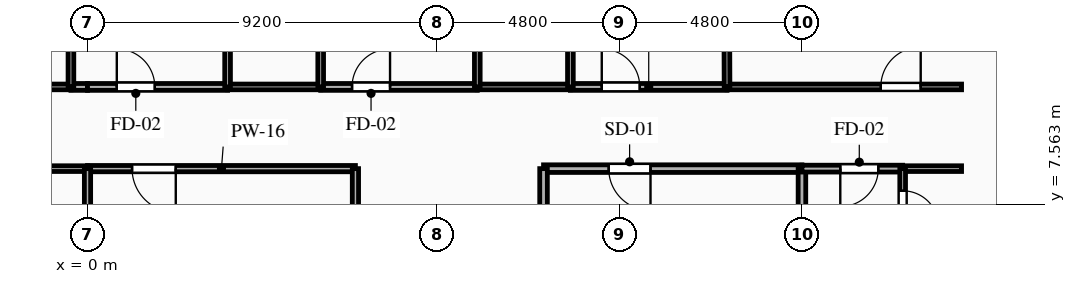
"""IFC4 building model, lengths in metres.
Left out: names, types, materials, properties, quantities, classifications, styles, units other than length and angle.
Written with IfcOpenShell. Run it as: python <this file> out.ifc"""

import sys

from ifc_helpers import new_model, si_unit, direction, frame, frame_2d, origin, place, context, subcontext, project, spatial, rectangle, extrude, element, fill, save


model = new_model("IFC4")
c1 = context("Model", 3, precision=1e-05, world=origin(), true_north=direction((0.0, 1.0)))
c2 = subcontext(c1, "Body", "Model", "MODEL_VIEW")
j1 = project(units=[si_unit("LENGTHUNIT", "METRE"), si_unit("PLANEANGLEUNIT", "RADIAN")], contexts=[c1])
p1 = place(None, origin())
s1 = spatial("IfcSite", under=j1, at=p1, CompositionType="ELEMENT")
p2 = place(p1, origin())
s2 = spatial("IfcBuilding", under=s1, at=p2, CompositionType="ELEMENT")
p3 = place(p2, frame((0.0, 0.0, 89.05)))
s3 = spatial("IfcBuildingStorey", under=s2, at=p3, CompositionType="ELEMENT", Elevation=89.05)
p4 = place(p3, frame((18.8, 8.5, 0.0), z_axis=(0.0, 0.0, 1.0), x_axis=(-1.0, 0.0, 0.0)))
e1 = element("IfcWall", 1, at=p4, inside=s3, PredefinedType="PARTITIONING", context=c2, shape_type="SweptSolid", body=[
    extrude(rectangle(XDim=6.8, YDim=0.2, at=frame_2d((3.4, 0.0))), origin(), (0.0, 0.0, 1.0), 3.045),
])
p5 = place(p4, frame((3.985, 0.0, 0.0)))
e2 = element("IfcOpeningElement", 2, at=p5, cuts=e1, PredefinedType="OPENING", context=c2, shape_type="SweptSolid", body=[
    extrude(rectangle(XDim=1.1, YDim=2.15, at=frame_2d((0.55, 1.075))), frame((0.0, 0.11, 0.0), z_axis=(0.0, -1.0, 0.0), x_axis=(1.0, 0.0, 0.0)), (0.0, 0.0, 1.0), 0.22),
])
p6 = place(p3, frame((12.0, 8.5, 0.0), z_axis=(0.0, 0.0, 1.0), x_axis=(0.0, -1.0, 0.0)))
e3 = element("IfcWall", 3, at=p6, inside=s3, PredefinedType="PARTITIONING", context=c2, shape_type="SweptSolid", body=[
    extrude(rectangle(XDim=2.9, YDim=0.2, at=frame_2d((1.45, 0.0))), origin(), (0.0, 0.0, 1.0), 3.045),
])
p7 = place(p3, frame((18.8, 5.6, 0.0), z_axis=(0.0, 0.0, 1.0), x_axis=(0.0, 1.0, 0.0)))
e4 = element("IfcWall", 4, at=p7, inside=s3, PredefinedType="PARTITIONING", context=c2, shape_type="SweptSolid", body=[
    extrude(rectangle(XDim=2.9, YDim=0.2, at=frame_2d((1.45, 0.0))), origin(), (0.0, 0.0, 1.0), 2.53),
])
p8 = place(p3, frame((-0.436, 10.65, 0.0), z_axis=(0.0, 0.0, 1.0), x_axis=(1.0, 0.0, 0.0)))
e5 = element("IfcWall", 5, at=p8, inside=s3, PredefinedType="PARTITIONING", context=c2, shape_type="SweptSolid", body=[
    extrude(rectangle(XDim=0.436, YDim=0.18, at=frame_2d((0.218, 0.0))), origin(), (0.0, 0.0, 1.0), 3.045),
])
p9 = place(p3, frame((-2.886, 10.65, 0.0), z_axis=(0.0, 0.0, 1.0), x_axis=(1.0, 0.0, 0.0)))
e6 = element("IfcWall", 6, at=p9, inside=s3, PredefinedType="PLUMBINGWALL", context=c2, shape_type="SweptSolid", body=[
    extrude(rectangle(XDim=2.45, YDim=0.15, at=frame_2d((1.225, 0.0))), origin(), (0.0, 0.0, 1.0), 3.045),
])
p10 = place(p3, frame((0.0, 8.5, 0.0), z_axis=(0.0, 0.0, 1.0), x_axis=(-1.0, 0.0, 0.0)))
e7 = element("IfcWall", 7, at=p10, inside=s3, PredefinedType="PARTITIONING", context=c2, shape_type="SweptSolid", body=[
    extrude(rectangle(XDim=7.05, YDim=0.15, at=frame_2d((3.525, 0.0))), origin(), (0.0, 0.0, 1.0), 3.045),
])
p11 = place(p3, frame((21.45, 8.5, 0.0), z_axis=(0.0, 0.0, 1.0), x_axis=(-1.0, 0.0, 0.0)))
e8 = element("IfcWall", 8, at=p11, inside=s3, PredefinedType="PARTITIONING", context=c2, shape_type="SweptSolid", body=[
    extrude(rectangle(XDim=2.65, YDim=0.18, at=frame_2d((1.325, 0.0))), origin(), (0.0, 0.0, 1.0), 3.045),
])
p12 = place(p11, frame((0.641, 0.0, 0.0)))
e9 = element("IfcOpeningElement", 9, at=p12, cuts=e8, PredefinedType="OPENING", context=c2, shape_type="SweptSolid", body=[
    extrude(rectangle(XDim=1.0, YDim=2.15, at=frame_2d((0.5, 1.075))), frame((0.0, 0.1, 0.0), z_axis=(0.0, -1.0, 0.0), x_axis=(1.0, 0.0, 0.0)), (0.0, 0.0, 1.0), 0.2),
])
p13 = place(p3, frame((23.0, 8.5, 0.0), z_axis=(0.0, 0.0, 1.0), x_axis=(-1.0, 0.0, 0.0)))
e10 = element("IfcWall", 10, at=p13, inside=s3, PredefinedType="PARTITIONING", context=c2, shape_type="SweptSolid", body=[
    extrude(rectangle(XDim=1.55, YDim=0.15, at=frame_2d((0.775, 0.0))), origin(), (0.0, 0.0, 1.0), 3.045),
])
p14 = place(p3, frame((0.0, 10.65, 0.0), z_axis=(0.0, 0.0, 1.0), x_axis=(1.0, 0.0, 0.0)))
e11 = element("IfcWall", 11, at=p14, inside=s3, PredefinedType="PARTITIONING", context=c2, shape_type="SweptSolid", body=[
    extrude(rectangle(XDim=3.686, YDim=0.18, at=frame_2d((1.843, 0.0))), origin(), (0.0, 0.0, 1.0), 3.045),
])
p15 = place(p14, frame((0.771, 0.0, 0.0)))
e12 = element("IfcOpeningElement", 12, at=p15, cuts=e11, PredefinedType="OPENING", context=c2, shape_type="SweptSolid", body=[
    extrude(rectangle(XDim=1.0, YDim=2.15, at=frame_2d((0.5, 1.075))), frame((0.0, 0.1, 0.0), z_axis=(0.0, -1.0, 0.0), x_axis=(1.0, 0.0, 0.0)), (0.0, 0.0, 1.0), 0.2),
])
p16 = place(p3, frame((6.136, 10.65, 0.0), z_axis=(0.0, 0.0, 1.0), x_axis=(1.0, 0.0, 0.0)))
e13 = element("IfcWall", 13, at=p16, inside=s3, PredefinedType="PARTITIONING", context=c2, shape_type="SweptSolid", body=[
    extrude(rectangle(XDim=4.121, YDim=0.18, at=frame_2d((2.061, 0.0))), origin(), (0.0, 0.0, 1.0), 3.045),
])
p17 = place(p16, frame((0.825, 0.0, 0.0)))
e14 = element("IfcOpeningElement", 14, at=p17, cuts=e13, PredefinedType="OPENING", context=c2, shape_type="SweptSolid", body=[
    extrude(rectangle(XDim=1.0, YDim=2.15, at=frame_2d((0.5, 1.075))), frame((0.0, 0.1, 0.0), z_axis=(0.0, -1.0, 0.0), x_axis=(1.0, 0.0, 0.0)), (0.0, 0.0, 1.0), 0.2),
])
p18 = place(p3, frame((3.686, 10.65, 0.0), z_axis=(0.0, 0.0, 1.0), x_axis=(1.0, 0.0, 0.0)))
e15 = element("IfcWall", 15, at=p18, inside=s3, PredefinedType="PLUMBINGWALL", context=c2, shape_type="SweptSolid", body=[
    extrude(rectangle(XDim=2.45, YDim=0.15, at=frame_2d((1.225, 0.0))), origin(), (0.0, 0.0, 1.0), 3.045),
])
p19 = place(p3, frame((12.707, 10.65, 0.0), z_axis=(0.0, 0.0, 1.0), x_axis=(1.0, 0.0, 0.0)))
e16 = element("IfcWall", 16, at=p19, inside=s3, PredefinedType="PARTITIONING", context=c2, shape_type="SweptSolid", body=[
    extrude(rectangle(XDim=4.122, YDim=0.18, at=frame_2d((2.061, 0.0))), origin(), (0.0, 0.0, 1.0), 3.045),
])
p20 = place(p19, frame((0.825, 0.0, 0.0)))
e17 = element("IfcOpeningElement", 17, at=p20, cuts=e16, PredefinedType="OPENING", context=c2, shape_type="SweptSolid", body=[
    extrude(rectangle(XDim=1.0, YDim=2.15, at=frame_2d((0.5, 1.075))), frame((0.0, 0.1, 0.0), z_axis=(0.0, -1.0, 0.0), x_axis=(1.0, 0.0, 0.0)), (0.0, 0.0, 1.0), 0.2),
])
p21 = place(p3, frame((10.257, 10.65, 0.0), z_axis=(0.0, 0.0, 1.0), x_axis=(1.0, 0.0, 0.0)))
e18 = element("IfcWall", 18, at=p21, inside=s3, PredefinedType="PLUMBINGWALL", context=c2, shape_type="SweptSolid", body=[
    extrude(rectangle(XDim=2.45, YDim=0.15, at=frame_2d((1.225, 0.0))), origin(), (0.0, 0.0, 1.0), 3.045),
])
p22 = place(p3, frame((16.829, 10.65, 0.0), z_axis=(0.0, 0.0, 1.0), x_axis=(1.0, 0.0, 0.0)))
e19 = element("IfcWall", 19, at=p22, inside=s3, PredefinedType="PARTITIONING", context=c2, shape_type="SweptSolid", body=[
    extrude(rectangle(XDim=6.171, YDim=0.15, at=frame_2d((3.085, 0.0))), origin(), (0.0, 0.0, 1.0), 3.045),
])
p23 = place(p22, frame((4.046, 0.0, 0.0)))
e20 = element("IfcOpeningElement", 20, at=p23, cuts=e19, PredefinedType="OPENING", context=c2, shape_type="SweptSolid", body=[
    extrude(rectangle(XDim=1.05, YDim=2.15, at=frame_2d((0.525, 1.075))), frame((0.0, 0.085, 0.0), z_axis=(0.0, -1.0, 0.0), x_axis=(1.0, 0.0, 0.0)), (0.0, 0.0, 1.0), 0.17),
])
p24 = place(p3, frame((7.05, 8.5, 0.0), z_axis=(0.0, 0.0, 1.0), x_axis=(-1.0, 0.0, 0.0)))
e21 = element("IfcWall", 21, at=p24, inside=s3, PredefinedType="PARTITIONING", context=c2, shape_type="SweptSolid", body=[
    extrude(rectangle(XDim=7.05, YDim=0.165, at=frame_2d((3.525, 0.0))), origin(), (0.0, 0.0, 1.0), 3.045),
])
p25 = place(p24, frame((4.728, 0.0, 0.0)))
e22 = element("IfcOpeningElement", 22, at=p25, cuts=e21, PredefinedType="OPENING", context=c2, shape_type="SweptSolid", body=[
    extrude(rectangle(XDim=1.15, YDim=2.15, at=frame_2d((0.575, 1.075))), frame((0.0, 0.093, 0.0), z_axis=(0.0, -1.0, 0.0), x_axis=(1.0, 0.0, 0.0)), (0.0, 0.0, 1.0), 0.185),
])
p26 = place(p3, frame((7.05, 1.45, 0.0), z_axis=(0.0, 0.0, 1.0), x_axis=(0.0, 1.0, 0.0)))
e23 = element("IfcWall", 23, at=p26, inside=s3, PredefinedType="PARTITIONING", context=c2, shape_type="SweptSolid", body=[
    extrude(rectangle(XDim=7.05, YDim=0.165, at=frame_2d((3.525, 0.0))), origin(), (0.0, 0.0, 1.0), 3.045),
])
p27 = place(p3, frame((21.45, 8.5, 0.0), z_axis=(0.0, 0.0, 1.0), x_axis=(0.0, -1.0, 0.0)))
e24 = element("IfcWall", 24, at=p27, inside=s3, PredefinedType="PARTITIONING", context=c2, shape_type="SweptSolid", body=[
    extrude(rectangle(XDim=2.115, YDim=0.15, at=frame_2d((1.058, 0.0))), origin(), (0.0, 0.0, 1.0), 3.045),
])
p28 = place(p27, frame((0.583, 0.0, 0.0)))
e25 = element("IfcOpeningElement", 25, at=p28, cuts=e24, PredefinedType="OPENING", context=c2, shape_type="SweptSolid", body=[
    extrude(rectangle(XDim=0.95, YDim=2.1, at=frame_2d((0.475, 1.05))), frame((0.0, 0.085, 0.0), z_axis=(0.0, -1.0, 0.0), x_axis=(1.0, 0.0, 0.0)), (0.0, 0.0, 1.0), 0.17),
])
for number, where, z_axis, x_axis in (
    (26, (-0.436, 10.65, 0.0), (0.0, 0.0, 1.0), (0.0, 1.0, 0.0)),
    (27, (3.686, 12.8, 0.0), (0.0, 0.0, 1.0), (0.0, -1.0, 0.0)),
    (28, (6.136, 10.65, 0.0), (0.0, 0.0, 1.0), (0.0, 1.0, 0.0)),
    (29, (10.257, 12.8, 0.0), (0.0, 0.0, 1.0), (0.0, -1.0, 0.0)),
    (30, (12.707, 10.65, 0.0), (0.0, 0.0, 1.0), (0.0, 1.0, 0.0)),
):
    element("IfcWall", number, at=place(p3, frame(where, z_axis=z_axis, x_axis=x_axis)), inside=s3, PredefinedType="PLUMBINGWALL", context=c2, shape_type="SweptSolid", body=[
        extrude(rectangle(XDim=2.15, YDim=0.15, at=frame_2d((1.075, 0.0))), origin(), (0.0, 0.0, 1.0), 3.045),
    ])
p29 = place(p3, frame((16.785, 22.199, 0.0), z_axis=(0.0, 0.0, 1.0), x_axis=(0.003805067053, -0.999992760706, 0.0)))
e31 = element("IfcWall", 31, at=p29, inside=s3, PredefinedType="PARTITIONING", context=c2, shape_type="SweptSolid", body=[
    extrude(rectangle(XDim=11.549, YDim=0.15, at=frame_2d((5.774, 0.0))), origin(), (0.0, 0.0, 1.0), 3.045),
])
p30 = place(p3, frame((0.0, 8.5, 0.0), z_axis=(0.0, 0.0, 1.0), x_axis=(0.0, -1.0, 0.0)))
e32 = element("IfcWall", 32, at=p30, inside=s3, PredefinedType="PARTITIONING", context=c2, shape_type="SweptSolid", body=[
    extrude(rectangle(XDim=7.05, YDim=0.165, at=frame_2d((3.525, 0.0))), origin(), (0.0, 0.0, 1.0), 3.045),
])
p31 = place(p5, origin())
e33 = element("IfcDoor", 33, at=p31, inside=s3, OperationType="SINGLE_SWING_LEFT", PredefinedType="DOOR", context=c2, shape_type="SweptSolid", body=[
    extrude(rectangle(XDim=1.1, YDim=2.15, at=frame_2d((0.55, 1.075))), frame((0.0, 0.025, 0.0), z_axis=(0.0, -1.0, 0.0), x_axis=(1.0, 0.0, 0.0)), (0.0, 0.0, 1.0), 0.05),
])
fill(e2, e33)
p32 = place(p12, origin())
e34 = element("IfcDoor", 34, at=p32, inside=s3, OperationType="SINGLE_SWING_RIGHT", PredefinedType="DOOR", context=c2, shape_type="SweptSolid", body=[
    extrude(rectangle(XDim=1.0, YDim=2.15, at=frame_2d((0.5, 1.075))), frame((0.0, 0.025, 0.0), z_axis=(0.0, -1.0, 0.0), x_axis=(1.0, 0.0, 0.0)), (0.0, 0.0, 1.0), 0.05),
])
fill(e9, e34)
p33 = place(p15, origin())
e35 = element("IfcDoor", 35, at=p33, inside=s3, OperationType="SINGLE_SWING_LEFT", PredefinedType="DOOR", context=c2, shape_type="SweptSolid", body=[
    extrude(rectangle(XDim=1.0, YDim=2.15, at=frame_2d((0.5, 1.075))), frame((0.0, 0.025, 0.0), z_axis=(0.0, -1.0, 0.0), x_axis=(1.0, 0.0, 0.0)), (0.0, 0.0, 1.0), 0.05),
])
fill(e12, e35)
p34 = place(p17, origin())
e36 = element("IfcDoor", 36, at=p34, inside=s3, OperationType="SINGLE_SWING_RIGHT", PredefinedType="DOOR", context=c2, shape_type="SweptSolid", body=[
    extrude(rectangle(XDim=1.0, YDim=2.15, at=frame_2d((0.5, 1.075))), frame((0.0, 0.025, 0.0), z_axis=(0.0, -1.0, 0.0), x_axis=(1.0, 0.0, 0.0)), (0.0, 0.0, 1.0), 0.05),
])
fill(e14, e36)
p35 = place(p20, origin())
e37 = element("IfcDoor", 37, at=p35, inside=s3, OperationType="SINGLE_SWING_LEFT", PredefinedType="DOOR", context=c2, shape_type="SweptSolid", body=[
    extrude(rectangle(XDim=1.0, YDim=2.15, at=frame_2d((0.5, 1.075))), frame((0.0, 0.025, 0.0), z_axis=(0.0, -1.0, 0.0), x_axis=(1.0, 0.0, 0.0)), (0.0, 0.0, 1.0), 0.05),
])
fill(e17, e37)
p36 = place(p23, origin())
e38 = element("IfcDoor", 38, at=p36, inside=s3, OperationType="SINGLE_SWING_RIGHT", PredefinedType="DOOR", context=c2, shape_type="SweptSolid", body=[
    extrude(rectangle(XDim=1.05, YDim=2.15, at=frame_2d((0.525, 1.075))), frame((0.0, 0.025, 0.0), z_axis=(0.0, -1.0, 0.0), x_axis=(1.0, 0.0, 0.0)), (0.0, 0.0, 1.0), 0.05),
])
fill(e20, e38)
p37 = place(p25, origin())
e39 = element("IfcDoor", 39, at=p37, inside=s3, OperationType="SINGLE_SWING_LEFT", PredefinedType="DOOR", context=c2, shape_type="SweptSolid", body=[
    extrude(rectangle(XDim=1.15, YDim=2.15, at=frame_2d((0.575, 1.075))), frame((0.0, 0.025, 0.0), z_axis=(0.0, -1.0, 0.0), x_axis=(1.0, 0.0, 0.0)), (0.0, 0.0, 1.0), 0.05),
])
fill(e22, e39)
p38 = place(p28, origin())
e40 = element("IfcDoor", 40, at=p38, inside=s3, OperationType="SINGLE_SWING_RIGHT", PredefinedType="DOOR", context=c2, shape_type="SweptSolid", body=[
    extrude(rectangle(XDim=0.95, YDim=2.1, at=frame_2d((0.475, 1.05))), frame((0.0, 0.025, 0.0), z_axis=(0.0, -1.0, 0.0), x_axis=(1.0, 0.0, 0.0)), (0.0, 0.0, 1.0), 0.05),
])
fill(e25, e40)
save(model, sys.argv[1])
